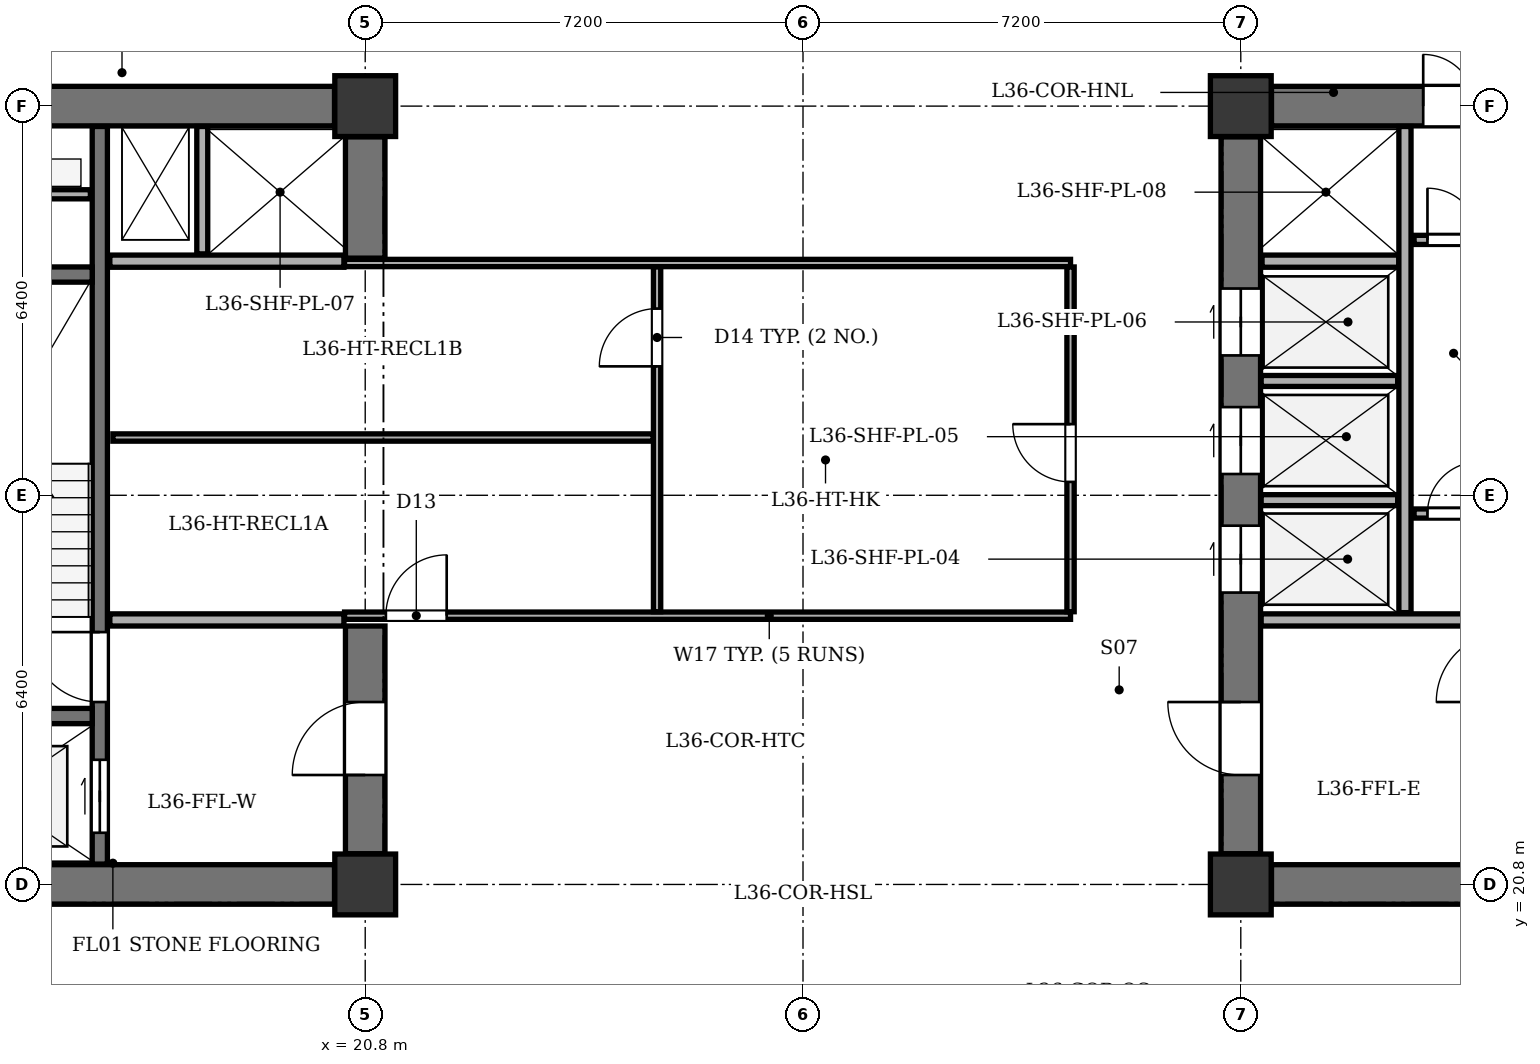
"""IFC4 building model, lengths in metres.
Left out: names, types, materials, properties, quantities, classifications, styles, units other than length and angle.
Written with IfcOpenShell. Run it as: python <this file> out.ifc"""

import sys

from ifc_helpers import new_model, si_unit, direction, frame, frame_2d, origin, origin_2d, place, context, subcontext, project, spatial, rectangle, extrude, element, fill, save


model = new_model("IFC4")
c1 = context("Model", 3, precision=1e-05, world=origin(), true_north=direction((0.0, 1.0)))
c2 = subcontext(c1, "Body", "Model", "MODEL_VIEW")
j1 = project(units=[si_unit("LENGTHUNIT", "METRE"), si_unit("PLANEANGLEUNIT", "RADIAN")], contexts=[c1])
p1 = place(None, origin())
s1 = spatial("IfcSite", under=j1, at=p1, CompositionType="ELEMENT")
p2 = place(p1, origin())
s2 = spatial("IfcBuilding", under=s1, at=p2, CompositionType="ELEMENT")
p3 = place(p2, frame((0.0, 0.0, 144.8)))
s3 = spatial("IfcBuildingStorey", under=s2, at=p3, CompositionType="ELEMENT", Elevation=144.8)
for number, where, z_axis, x_axis in (
    (1, (20.8, 20.8, 0.0), (0.0, 0.0, 1.0), (1.0, 0.0, 0.0)),
    (2, (20.8, 33.6, 0.0), (0.0, 0.0, 1.0), (1.0, 0.0, 0.0)),
    (3, (35.2, 20.8, 0.0), (0.0, 0.0, 1.0), (1.0, 0.0, 0.0)),
    (4, (35.2, 33.6, 0.0), (0.0, 0.0, 1.0), (1.0, 0.0, 0.0)),
):
    element("IfcColumn", number, at=place(p3, frame(where, z_axis=z_axis, x_axis=x_axis)), inside=s3, PredefinedType="COLUMN", context=c2, shape_type="SweptSolid", body=[
        extrude(rectangle(XDim=1.0, YDim=1.0, at=origin_2d()), origin(), (0.0, 0.0, 1.0), 3.5),
    ])
p4 = place(p3, frame((13.305, 20.8, 0.0), z_axis=(0.0, 0.0, 1.0), x_axis=(1.0, 0.0, 0.0)))
e5 = element("IfcWall", 5, at=p4, inside=s3, PredefinedType="SHEAR", context=c2, shape_type="SweptSolid", body=[
    extrude(rectangle(XDim=6.99, YDim=0.65, at=frame_2d((3.495, 0.0))), origin(), (0.0, 0.0, 1.0), 3.2),
])
p5 = place(p3, frame((13.305, 33.6, 0.0), z_axis=(0.0, 0.0, 1.0), x_axis=(1.0, 0.0, 0.0)))
e6 = element("IfcWall", 6, at=p5, inside=s3, PredefinedType="SHEAR", context=c2, shape_type="SweptSolid", body=[
    extrude(rectangle(XDim=6.99, YDim=0.65, at=frame_2d((3.495, 0.0))), origin(), (0.0, 0.0, 1.0), 3.2),
])
p6 = place(p5, frame((1.095, 0.0, 0.0)))
e7 = element("IfcOpeningElement", 7, at=p6, cuts=e6, PredefinedType="OPENING", context=c2, shape_type="SweptSolid", body=[
    extrude(rectangle(XDim=0.85, YDim=2.02, at=frame_2d((0.425, 1.01))), frame((0.0, 0.335, 0.0), z_axis=(0.0, -1.0, 0.0), x_axis=(1.0, 0.0, 0.0)), (0.0, 0.0, 1.0), 0.67),
])
p7 = place(p3, frame((20.8, 21.305, 0.0), z_axis=(0.0, 0.0, 1.0), x_axis=(0.0, 1.0, 0.0)))
e8 = element("IfcWall", 8, at=p7, inside=s3, PredefinedType="SHEAR", context=c2, shape_type="SweptSolid", body=[
    extrude(rectangle(XDim=3.745, YDim=0.65, at=frame_2d((1.873, 0.0))), origin(), (0.0, 0.0, 1.0), 3.2),
])
p8 = place(p7, frame((1.295, 0.0, 0.0)))
e9 = element("IfcOpeningElement", 9, at=p8, cuts=e8, PredefinedType="OPENING", context=c2, shape_type="SweptSolid", body=[
    extrude(rectangle(XDim=1.2, YDim=2.15, at=frame_2d((0.6, 1.075))), frame((0.0, 0.335, 0.0), z_axis=(0.0, -1.0, 0.0), x_axis=(1.0, 0.0, 0.0)), (0.0, 0.0, 1.0), 0.67),
])
p9 = place(p3, frame((20.8, 31.1, 0.0), z_axis=(0.0, 0.0, 1.0), x_axis=(0.0, 1.0, 0.0)))
e10 = element("IfcWall", 10, at=p9, inside=s3, PredefinedType="SHEAR", context=c2, shape_type="SweptSolid", body=[
    extrude(rectangle(XDim=1.995, YDim=0.65, at=frame_2d((0.998, 0.0))), origin(), (0.0, 0.0, 1.0), 3.2),
])
p10 = place(p3, frame((16.435, 21.135, 0.0), z_axis=(0.0, 0.0, 1.0), x_axis=(0.0, 1.0, 0.0)))
e11 = element("IfcWall", 11, at=p10, inside=s3, PredefinedType="SHEAR", context=c2, shape_type="SweptSolid", body=[
    extrude(rectangle(XDim=12.13, YDim=0.25, at=frame_2d((6.065, 0.0))), origin(), (0.0, 0.0, 1.0), 3.2),
])
p11 = place(p10, frame((0.515, 0.0, 0.0)))
e12 = element("IfcOpeningElement", 12, at=p11, cuts=e11, PredefinedType="OPENING", context=c2, shape_type="SweptSolid", body=[
    extrude(rectangle(XDim=1.2, YDim=2.15, at=frame_2d((0.6, 1.075))), frame((0.0, 0.135, 0.0), z_axis=(0.0, -1.0, 0.0), x_axis=(1.0, 0.0, 0.0)), (0.0, 0.0, 1.0), 0.27),
])
p12 = place(p10, frame((2.665, 0.0, 0.0)))
e13 = element("IfcOpeningElement", 13, at=p12, cuts=e11, PredefinedType="OPENING", context=c2, shape_type="SweptSolid", body=[
    extrude(rectangle(XDim=1.15, YDim=2.15, at=frame_2d((0.575, 1.075))), frame((0.0, 0.135, 0.0), z_axis=(0.0, -1.0, 0.0), x_axis=(1.0, 0.0, 0.0)), (0.0, 0.0, 1.0), 0.27),
])
for number, where, z_axis, x_axis in (
    (14, (13.135, 23.57, 0.0), (0.0, 0.0, 1.0), (1.0, 0.0, 0.0)),
    (15, (13.135, 30.83, 0.0), (0.0, 0.0, 1.0), (1.0, 0.0, 0.0)),
):
    element("IfcWall", number, at=place(p3, frame(where, z_axis=z_axis, x_axis=x_axis)), inside=s3, PredefinedType="SHEAR", context=c2, shape_type="SweptSolid", body=[
        extrude(rectangle(XDim=3.175, YDim=0.25, at=frame_2d((1.587, 0.0))), origin(), (0.0, 0.0, 1.0), 3.2),
    ])
for number, where, z_axis, x_axis in (
    (16, (16.6, 25.15, 0.0), (0.0, 0.0, 1.0), (1.0, 0.0, 0.0)),
    (17, (16.6, 31.05, 0.0), (0.0, 0.0, 1.0), (1.0, 0.0, 0.0)),
):
    element("IfcWall", number, at=place(p3, frame(where, z_axis=z_axis, x_axis=x_axis)), inside=s3, PredefinedType="SOLIDWALL", context=c2, shape_type="SweptSolid", body=[
        extrude(rectangle(XDim=3.85, YDim=0.2, at=frame_2d((1.925, 0.0))), origin(), (0.0, 0.0, 1.0), 3.2),
    ])
p13 = place(p3, frame((18.12, 31.17, 0.0), z_axis=(0.0, 0.0, 1.0), x_axis=(0.0, 1.0, 0.0)))
e18 = element("IfcWall", 18, at=p13, inside=s3, PredefinedType="PARTITIONING", context=c2, shape_type="SweptSolid", body=[
    extrude(rectangle(XDim=2.095, YDim=0.18, at=frame_2d((1.047, 0.0))), origin(), (0.0, 0.0, 1.0), 3.2),
])
p14 = place(p3, frame((35.705, 20.8, 0.0), z_axis=(0.0, 0.0, 1.0), x_axis=(1.0, 0.0, 0.0)))
e19 = element("IfcWall", 19, at=p14, inside=s3, PredefinedType="SHEAR", context=c2, shape_type="SweptSolid", body=[
    extrude(rectangle(XDim=6.99, YDim=0.65, at=frame_2d((3.495, 0.0))), origin(), (0.0, 0.0, 1.0), 3.2),
])
p15 = place(p3, frame((35.705, 33.6, 0.0), z_axis=(0.0, 0.0, 1.0), x_axis=(1.0, 0.0, 0.0)))
e20 = element("IfcWall", 20, at=p15, inside=s3, PredefinedType="SHEAR", context=c2, shape_type="SweptSolid", body=[
    extrude(rectangle(XDim=6.99, YDim=0.65, at=frame_2d((3.495, 0.0))), origin(), (0.0, 0.0, 1.0), 3.2),
])
p16 = place(p15, frame((4.695, 0.0, 0.0)))
e21 = element("IfcOpeningElement", 21, at=p16, cuts=e20, PredefinedType="OPENING", context=c2, shape_type="SweptSolid", body=[
    extrude(rectangle(XDim=1.3, YDim=2.15, at=frame_2d((0.65, 1.075))), frame((0.0, 0.335, 0.0), z_axis=(0.0, -1.0, 0.0), x_axis=(1.0, 0.0, 0.0)), (0.0, 0.0, 1.0), 0.67),
])
p17 = place(p15, frame((2.495, 0.0, 0.0)))
e22 = element("IfcOpeningElement", 22, at=p17, cuts=e20, PredefinedType="OPENING", context=c2, shape_type="SweptSolid", body=[
    extrude(rectangle(XDim=0.85, YDim=2.02, at=frame_2d((0.425, 1.01))), frame((0.0, 0.335, 0.0), z_axis=(0.0, -1.0, 0.0), x_axis=(1.0, 0.0, 0.0)), (0.0, 0.0, 1.0), 0.67),
])
p18 = place(p3, frame((35.2, 21.305, 0.0), z_axis=(0.0, 0.0, 1.0), x_axis=(0.0, 1.0, 0.0)))
e23 = element("IfcWall", 23, at=p18, inside=s3, PredefinedType="SHEAR", context=c2, shape_type="SweptSolid", body=[
    extrude(rectangle(XDim=11.79, YDim=0.65, at=frame_2d((5.895, 0.0))), origin(), (0.0, 0.0, 1.0), 3.2),
])
p19 = place(p18, frame((1.295, 0.0, 0.0)))
e24 = element("IfcOpeningElement", 24, at=p19, cuts=e23, PredefinedType="OPENING", context=c2, shape_type="SweptSolid", body=[
    extrude(rectangle(XDim=1.2, YDim=2.15, at=frame_2d((0.6, 1.075))), frame((0.0, 0.335, 0.0), z_axis=(0.0, -1.0, 0.0), x_axis=(1.0, 0.0, 0.0)), (0.0, 0.0, 1.0), 0.67),
])
p20 = place(p18, frame((4.295, 0.0, 0.0)))
e25 = element("IfcOpeningElement", 25, at=p20, cuts=e23, PredefinedType="OPENING", context=c2, shape_type="SweptSolid", body=[
    extrude(rectangle(XDim=1.1, YDim=2.1, at=frame_2d((0.55, 1.05))), frame((0.0, 0.335, 0.0), z_axis=(0.0, -1.0, 0.0), x_axis=(1.0, 0.0, 0.0)), (0.0, 0.0, 1.0), 0.67),
])
p21 = place(p18, frame((6.245, 0.0, 0.0)))
e26 = element("IfcOpeningElement", 26, at=p21, cuts=e23, PredefinedType="OPENING", context=c2, shape_type="SweptSolid", body=[
    extrude(rectangle(XDim=1.1, YDim=2.1, at=frame_2d((0.55, 1.05))), frame((0.0, 0.335, 0.0), z_axis=(0.0, -1.0, 0.0), x_axis=(1.0, 0.0, 0.0)), (0.0, 0.0, 1.0), 0.67),
])
p22 = place(p18, frame((8.195, 0.0, 0.0)))
e27 = element("IfcOpeningElement", 27, at=p22, cuts=e23, PredefinedType="OPENING", context=c2, shape_type="SweptSolid", body=[
    extrude(rectangle(XDim=1.1, YDim=2.1, at=frame_2d((0.55, 1.05))), frame((0.0, 0.335, 0.0), z_axis=(0.0, -1.0, 0.0), x_axis=(1.0, 0.0, 0.0)), (0.0, 0.0, 1.0), 0.67),
])
p23 = place(p3, frame((35.535, 25.15, 0.0), z_axis=(0.0, 0.0, 1.0), x_axis=(1.0, 0.0, 0.0)))
e28 = element("IfcWall", 28, at=p23, inside=s3, PredefinedType="SOLIDWALL", context=c2, shape_type="SweptSolid", body=[
    extrude(rectangle(XDim=3.865, YDim=0.2, at=frame_2d((1.933, 0.0))), origin(), (0.0, 0.0, 1.0), 3.2),
])
p24 = place(p3, frame((35.55, 31.05, 0.0), z_axis=(0.0, 0.0, 1.0), x_axis=(1.0, 0.0, 0.0)))
e29 = element("IfcWall", 29, at=p24, inside=s3, PredefinedType="SOLIDWALL", context=c2, shape_type="SweptSolid", body=[
    extrude(rectangle(XDim=2.25, YDim=0.2, at=frame_2d((1.125, 0.0))), origin(), (0.0, 0.0, 1.0), 3.2),
])
p25 = place(p3, frame((37.9, 25.27, 0.0), z_axis=(0.0, 0.0, 1.0), x_axis=(0.0, 1.0, 0.0)))
e30 = element("IfcWall", 30, at=p25, inside=s3, PredefinedType="SOLIDWALL", context=c2, shape_type="SweptSolid", body=[
    extrude(rectangle(XDim=7.995, YDim=0.2, at=frame_2d((3.998, 0.0))), origin(), (0.0, 0.0, 1.0), 3.2),
])
for number, where, z_axis, x_axis in (
    (31, (35.535, 27.12, 0.0), (0.0, 0.0, 1.0), (1.0, 0.0, 0.0)),
    (32, (35.535, 29.08, 0.0), (0.0, 0.0, 1.0), (1.0, 0.0, 0.0)),
):
    element("IfcWall", number, at=place(p3, frame(where, z_axis=z_axis, x_axis=x_axis)), inside=s3, PredefinedType="PARTITIONING", context=c2, shape_type="SweptSolid", body=[
        extrude(rectangle(XDim=2.245, YDim=0.18, at=frame_2d((1.123, 0.0))), origin(), (0.0, 0.0, 1.0), 3.2),
    ])
p26 = place(p3, frame((13.18, 32.15, 0.0), z_axis=(0.0, 0.0, 1.0), x_axis=(1.0, 0.0, 0.0)))
e33 = element("IfcWall", 33, at=p26, inside=s3, PredefinedType="PARTITIONING", context=c2, shape_type="SweptSolid", body=[
    extrude(rectangle(XDim=3.1, YDim=0.15, at=frame_2d((1.55, 0.0))), origin(), (0.0, 0.0, 1.0), 3.2),
])
p27 = place(p26, frame((1.1, 0.0, 0.0)))
e34 = element("IfcOpeningElement", 34, at=p27, cuts=e33, PredefinedType="OPENING", context=c2, shape_type="SweptSolid", body=[
    extrude(rectangle(XDim=0.85, YDim=2.02, at=frame_2d((0.425, 1.01))), frame((0.0, 0.085, 0.0), z_axis=(0.0, -1.0, 0.0), x_axis=(1.0, 0.0, 0.0)), (0.0, 0.0, 1.0), 0.17),
])
p28 = place(p3, frame((38.05, 26.9, 0.0), z_axis=(0.0, 0.0, 1.0), x_axis=(1.0, 0.0, 0.0)))
e35 = element("IfcWall", 35, at=p28, inside=s3, PredefinedType="PARTITIONING", context=c2, shape_type="SweptSolid", body=[
    extrude(rectangle(XDim=1.3, YDim=0.15, at=frame_2d((0.65, 0.0))), origin(), (0.0, 0.0, 1.0), 3.2),
])
p29 = place(p28, frame((0.22, 0.0, 0.0)))
e36 = element("IfcOpeningElement", 36, at=p29, cuts=e35, PredefinedType="OPENING", context=c2, shape_type="SweptSolid", body=[
    extrude(rectangle(XDim=0.85, YDim=2.02, at=frame_2d((0.425, 1.01))), frame((0.0, 0.085, 0.0), z_axis=(0.0, -1.0, 0.0), x_axis=(1.0, 0.0, 0.0)), (0.0, 0.0, 1.0), 0.17),
])
p30 = place(p3, frame((38.05, 31.4, 0.0), z_axis=(0.0, 0.0, 1.0), x_axis=(1.0, 0.0, 0.0)))
e37 = element("IfcWall", 37, at=p30, inside=s3, PredefinedType="PARTITIONING", context=c2, shape_type="SweptSolid", body=[
    extrude(rectangle(XDim=1.3, YDim=0.15, at=frame_2d((0.65, 0.0))), origin(), (0.0, 0.0, 1.0), 3.2),
])
p31 = place(p30, frame((0.22, 0.0, 0.0)))
e38 = element("IfcOpeningElement", 38, at=p31, cuts=e37, PredefinedType="OPENING", context=c2, shape_type="SweptSolid", body=[
    extrude(rectangle(XDim=0.85, YDim=2.02, at=frame_2d((0.425, 1.01))), frame((0.0, 0.085, 0.0), z_axis=(0.0, -1.0, 0.0), x_axis=(1.0, 0.0, 0.0)), (0.0, 0.0, 1.0), 0.17),
])
p32 = place(p3, frame((20.46, 25.22, 0.0), z_axis=(0.0, 0.0, 1.0), x_axis=(1.0, 0.0, 0.0)))
e39 = element("IfcWall", 39, at=p32, inside=s3, PredefinedType="PARTITIONING", context=c2, shape_type="SweptSolid", body=[
    extrude(rectangle(XDim=11.94, YDim=0.12, at=frame_2d((5.97, 0.0))), origin(), (0.0, 0.0, 1.0), 3.2),
])
p33 = place(p32, frame((0.68, 0.0, 0.0)))
e40 = element("IfcOpeningElement", 40, at=p33, cuts=e39, PredefinedType="OPENING", context=c2, shape_type="SweptSolid", body=[
    extrude(rectangle(XDim=1.0, YDim=2.1, at=frame_2d((0.5, 1.05))), frame((0.0, 0.07, 0.0), z_axis=(0.0, -1.0, 0.0), x_axis=(1.0, 0.0, 0.0)), (0.0, 0.0, 1.0), 0.14),
])
p34 = place(p3, frame((20.46, 31.02, 0.0), z_axis=(0.0, 0.0, 1.0), x_axis=(1.0, 0.0, 0.0)))
e41 = element("IfcWall", 41, at=p34, inside=s3, PredefinedType="PARTITIONING", context=c2, shape_type="SweptSolid", body=[
    extrude(rectangle(XDim=11.94, YDim=0.12, at=frame_2d((5.97, 0.0))), origin(), (0.0, 0.0, 1.0), 3.2),
])
p35 = place(p3, frame((32.4, 25.285, 0.0), z_axis=(0.0, 0.0, 1.0), x_axis=(0.0, 1.0, 0.0)))
e42 = element("IfcWall", 42, at=p35, inside=s3, PredefinedType="PARTITIONING", context=c2, shape_type="SweptSolid", body=[
    extrude(rectangle(XDim=5.67, YDim=0.12, at=frame_2d((2.835, 0.0))), origin(), (0.0, 0.0, 1.0), 3.2),
])
p36 = place(p35, frame((2.135, 0.0, 0.0)))
e43 = element("IfcOpeningElement", 43, at=p36, cuts=e42, PredefinedType="OPENING", context=c2, shape_type="SweptSolid", body=[
    extrude(rectangle(XDim=0.95, YDim=2.1, at=frame_2d((0.475, 1.05))), frame((0.0, 0.07, 0.0), z_axis=(0.0, -1.0, 0.0), x_axis=(1.0, 0.0, 0.0)), (0.0, 0.0, 1.0), 0.14),
])
p37 = place(p3, frame((25.6, 25.285, 0.0), z_axis=(0.0, 0.0, 1.0), x_axis=(0.0, 1.0, 0.0)))
e44 = element("IfcWall", 44, at=p37, inside=s3, PredefinedType="PARTITIONING", context=c2, shape_type="SweptSolid", body=[
    extrude(rectangle(XDim=5.67, YDim=0.12, at=frame_2d((2.835, 0.0))), origin(), (0.0, 0.0, 1.0), 3.2),
])
p38 = place(p37, frame((4.035, 0.0, 0.0)))
e45 = element("IfcOpeningElement", 45, at=p38, cuts=e44, PredefinedType="OPENING", context=c2, shape_type="SweptSolid", body=[
    extrude(rectangle(XDim=0.95, YDim=2.1, at=frame_2d((0.475, 1.05))), frame((0.0, 0.07, 0.0), z_axis=(0.0, -1.0, 0.0), x_axis=(1.0, 0.0, 0.0)), (0.0, 0.0, 1.0), 0.14),
])
p39 = place(p3, frame((16.65, 28.15, 0.0), z_axis=(0.0, 0.0, 1.0), x_axis=(1.0, 0.0, 0.0)))
e46 = element("IfcWall", 46, at=p39, inside=s3, PredefinedType="PARTITIONING", context=c2, shape_type="SweptSolid", body=[
    extrude(rectangle(XDim=8.885, YDim=0.12, at=frame_2d((4.442, 0.0))), origin(), (0.0, 0.0, 1.0), 3.2),
])
p40 = place(p8, origin())
e47 = element("IfcDoor", 47, at=p40, inside=s3, OperationType="SINGLE_SWING_LEFT", PredefinedType="DOOR", context=c2, shape_type="SweptSolid", body=[
    extrude(rectangle(XDim=1.2, YDim=2.15, at=frame_2d((0.6, 1.075))), frame((0.0, 0.025, 0.0), z_axis=(0.0, -1.0, 0.0), x_axis=(1.0, 0.0, 0.0)), (0.0, 0.0, 1.0), 0.05),
])
fill(e9, e47)
p41 = place(p11, origin())
e48 = element("IfcDoor", 48, at=p41, inside=s3, OperationType="DOUBLE_DOOR_SLIDING", PredefinedType="DOOR", context=c2, shape_type="SweptSolid", body=[
    extrude(rectangle(XDim=1.2, YDim=2.15, at=frame_2d((0.6, 1.075))), frame((0.0, 0.025, 0.0), z_axis=(0.0, -1.0, 0.0), x_axis=(1.0, 0.0, 0.0)), (0.0, 0.0, 1.0), 0.05),
])
fill(e12, e48)
p42 = place(p12, origin())
e49 = element("IfcDoor", 49, at=p42, inside=s3, OperationType="SINGLE_SWING_RIGHT", PredefinedType="DOOR", context=c2, shape_type="SweptSolid", body=[
    extrude(rectangle(XDim=1.15, YDim=2.15, at=frame_2d((0.575, 1.075))), frame((0.0, 0.025, 0.0), z_axis=(0.0, -1.0, 0.0), x_axis=(1.0, 0.0, 0.0)), (0.0, 0.0, 1.0), 0.05),
])
fill(e13, e49)
p43 = place(p17, origin())
e50 = element("IfcDoor", 50, at=p43, inside=s3, OperationType="SINGLE_SWING_LEFT", PredefinedType="DOOR", context=c2, shape_type="SweptSolid", body=[
    extrude(rectangle(XDim=0.85, YDim=2.02, at=frame_2d((0.425, 1.01))), frame((0.0, 0.025, 0.0), z_axis=(0.0, -1.0, 0.0), x_axis=(1.0, 0.0, 0.0)), (0.0, 0.0, 1.0), 0.05),
])
fill(e22, e50)
p44 = place(p19, origin())
e51 = element("IfcDoor", 51, at=p44, inside=s3, OperationType="SINGLE_SWING_RIGHT", PredefinedType="DOOR", context=c2, shape_type="SweptSolid", body=[
    extrude(rectangle(XDim=1.2, YDim=2.15, at=frame_2d((0.6, 1.075))), frame((0.0, 0.025, 0.0), z_axis=(0.0, -1.0, 0.0), x_axis=(1.0, 0.0, 0.0)), (0.0, 0.0, 1.0), 0.05),
])
fill(e24, e51)
p45 = place(p20, origin())
e52 = element("IfcDoor", 52, at=p45, inside=s3, OperationType="DOUBLE_DOOR_SLIDING", PredefinedType="DOOR", context=c2, shape_type="SweptSolid", body=[
    extrude(rectangle(XDim=1.1, YDim=2.1, at=frame_2d((0.55, 1.05))), frame((0.0, 0.025, 0.0), z_axis=(0.0, -1.0, 0.0), x_axis=(1.0, 0.0, 0.0)), (0.0, 0.0, 1.0), 0.05),
])
fill(e25, e52)
p46 = place(p21, origin())
e53 = element("IfcDoor", 53, at=p46, inside=s3, OperationType="DOUBLE_DOOR_SLIDING", PredefinedType="DOOR", context=c2, shape_type="SweptSolid", body=[
    extrude(rectangle(XDim=1.1, YDim=2.1, at=frame_2d((0.55, 1.05))), frame((0.0, 0.025, 0.0), z_axis=(0.0, -1.0, 0.0), x_axis=(1.0, 0.0, 0.0)), (0.0, 0.0, 1.0), 0.05),
])
fill(e26, e53)
p47 = place(p22, origin())
e54 = element("IfcDoor", 54, at=p47, inside=s3, OperationType="DOUBLE_DOOR_SLIDING", PredefinedType="DOOR", context=c2, shape_type="SweptSolid", body=[
    extrude(rectangle(XDim=1.1, YDim=2.1, at=frame_2d((0.55, 1.05))), frame((0.0, 0.025, 0.0), z_axis=(0.0, -1.0, 0.0), x_axis=(1.0, 0.0, 0.0)), (0.0, 0.0, 1.0), 0.05),
])
fill(e27, e54)
p48 = place(p29, origin())
e55 = element("IfcDoor", 55, at=p48, inside=s3, OperationType="SINGLE_SWING_RIGHT", PredefinedType="DOOR", context=c2, shape_type="SweptSolid", body=[
    extrude(rectangle(XDim=0.85, YDim=2.02, at=frame_2d((0.425, 1.01))), frame((0.0, 0.025, 0.0), z_axis=(0.0, -1.0, 0.0), x_axis=(1.0, 0.0, 0.0)), (0.0, 0.0, 1.0), 0.05),
])
fill(e36, e55)
p49 = place(p31, origin())
e56 = element("IfcDoor", 56, at=p49, inside=s3, OperationType="SINGLE_SWING_LEFT", PredefinedType="DOOR", context=c2, shape_type="SweptSolid", body=[
    extrude(rectangle(XDim=0.85, YDim=2.02, at=frame_2d((0.425, 1.01))), frame((0.0, 0.025, 0.0), z_axis=(0.0, -1.0, 0.0), x_axis=(1.0, 0.0, 0.0)), (0.0, 0.0, 1.0), 0.05),
])
fill(e38, e56)
p50 = place(p33, origin())
e57 = element("IfcDoor", 57, at=p50, inside=s3, OperationType="SINGLE_SWING_RIGHT", PredefinedType="DOOR", context=c2, shape_type="SweptSolid", body=[
    extrude(rectangle(XDim=1.0, YDim=2.1, at=frame_2d((0.5, 1.05))), frame((0.0, 0.025, 0.0), z_axis=(0.0, -1.0, 0.0), x_axis=(1.0, 0.0, 0.0)), (0.0, 0.0, 1.0), 0.05),
])
fill(e40, e57)
p51 = place(p38, origin())
e58 = element("IfcDoor", 58, at=p51, inside=s3, OperationType="SINGLE_SWING_LEFT", PredefinedType="DOOR", context=c2, shape_type="SweptSolid", body=[
    extrude(rectangle(XDim=0.95, YDim=2.1, at=frame_2d((0.475, 1.05))), frame((0.0, 0.025, 0.0), z_axis=(0.0, -1.0, 0.0), x_axis=(1.0, 0.0, 0.0)), (0.0, 0.0, 1.0), 0.05),
])
fill(e45, e58)
p52 = place(p36, origin())
e59 = element("IfcDoor", 59, at=p52, inside=s3, OperationType="SINGLE_SWING_RIGHT", PredefinedType="DOOR", context=c2, shape_type="SweptSolid", body=[
    extrude(rectangle(XDim=0.95, YDim=2.1, at=frame_2d((0.475, 1.05))), frame((0.0, 0.025, 0.0), z_axis=(0.0, -1.0, 0.0), x_axis=(1.0, 0.0, 0.0)), (0.0, 0.0, 1.0), 0.05),
])
fill(e43, e59)
save(model, sys.argv[1])
